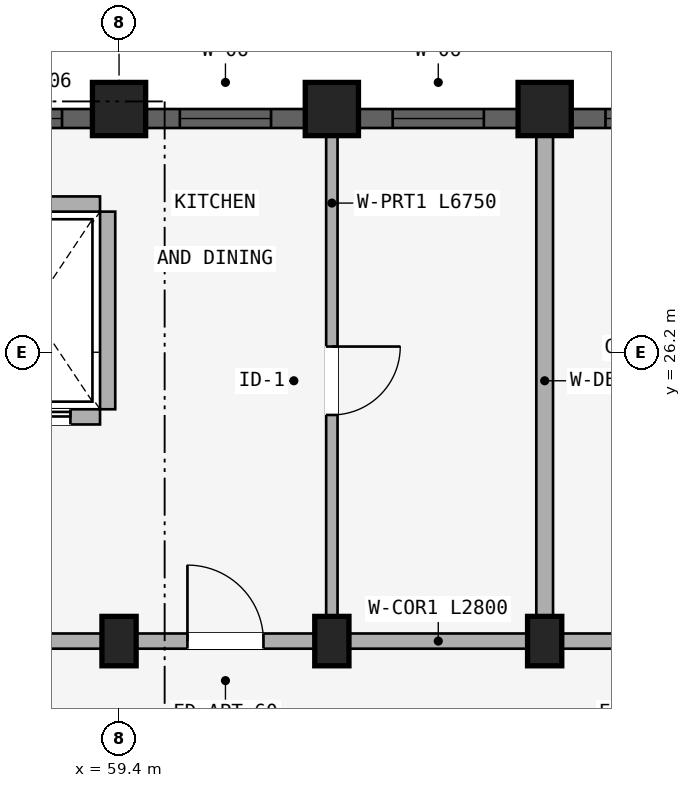
"""IFC4 building model, lengths in metres.
Left out: names, types, materials, properties, quantities, classifications, styles, units other than length and angle.
Written with IfcOpenShell. Run it as: python <this file> out.ifc"""

import sys

from ifc_helpers import new_model, si_unit, direction, frame, frame_2d, origin, origin_2d, place, context, subcontext, project, spatial, rectangle, extrude, element, fill, save


model = new_model("IFC4")
c1 = context("Model", 3, precision=1e-05, world=origin(), true_north=direction((0.0, 1.0)))
c2 = subcontext(c1, "Body", "Model", "MODEL_VIEW")
j1 = project(units=[si_unit("LENGTHUNIT", "METRE"), si_unit("PLANEANGLEUNIT", "RADIAN")], contexts=[c1])
p1 = place(None, origin())
s1 = spatial("IfcSite", under=j1, at=p1, CompositionType="ELEMENT")
p2 = place(p1, origin())
s2 = spatial("IfcBuilding", under=s1, at=p2, CompositionType="ELEMENT")
p3 = place(p2, frame((0.0, 0.0, 27.6)))
s3 = spatial("IfcBuildingStorey", under=s2, at=p3, CompositionType="ELEMENT", Elevation=27.6)
p4 = place(p3, frame((59.4, 29.4, 0.0), z_axis=(0.0, 0.0, 1.0), x_axis=(1.0, 0.0, 0.0)))
e1 = element("IfcColumn", 1, at=p4, inside=s3, PredefinedType="COLUMN", context=c2, shape_type="SweptSolid", body=[
    extrude(rectangle(XDim=0.7, YDim=0.7, at=origin_2d()), origin(), (0.0, 0.0, 1.0), 2.93),
])
p5 = place(p3, frame((59.4, 22.4, 0.0), z_axis=(0.0, 0.0, 1.0), x_axis=(1.0, 0.0, 0.0)))
e2 = element("IfcColumn", 2, at=p5, inside=s3, PredefinedType="COLUMN", context=c2, shape_type="SweptSolid", body=[
    extrude(rectangle(XDim=0.45, YDim=0.65, at=origin_2d()), origin(), (0.0, 0.0, 1.0), 2.93),
])
p6 = place(p3, frame((62.2, 29.4, 0.0), z_axis=(0.0, 0.0, 1.0), x_axis=(1.0, 0.0, 0.0)))
e3 = element("IfcColumn", 3, at=p6, inside=s3, PredefinedType="COLUMN", context=c2, shape_type="SweptSolid", body=[
    extrude(rectangle(XDim=0.7, YDim=0.7, at=origin_2d()), origin(), (0.0, 0.0, 1.0), 2.93),
])
p7 = place(p3, frame((62.2, 22.4, 0.0), z_axis=(0.0, 0.0, 1.0), x_axis=(1.0, 0.0, 0.0)))
e4 = element("IfcColumn", 4, at=p7, inside=s3, PredefinedType="COLUMN", context=c2, shape_type="SweptSolid", body=[
    extrude(rectangle(XDim=0.45, YDim=0.65, at=origin_2d()), origin(), (0.0, 0.0, 1.0), 2.93),
])
p8 = place(p3, frame((65.0, 29.4, 0.0), z_axis=(0.0, 0.0, 1.0), x_axis=(1.0, 0.0, 0.0)))
e5 = element("IfcColumn", 5, at=p8, inside=s3, PredefinedType="COLUMN", context=c2, shape_type="SweptSolid", body=[
    extrude(rectangle(XDim=0.7, YDim=0.7, at=origin_2d()), origin(), (0.0, 0.0, 1.0), 2.93),
])
p9 = place(p3, frame((65.0, 22.4, 0.0), z_axis=(0.0, 0.0, 1.0), x_axis=(1.0, 0.0, 0.0)))
e6 = element("IfcColumn", 6, at=p9, inside=s3, PredefinedType="COLUMN", context=c2, shape_type="SweptSolid", body=[
    extrude(rectangle(XDim=0.45, YDim=0.65, at=origin_2d()), origin(), (0.0, 0.0, 1.0), 2.93),
])
p10 = place(p3, frame((59.25, 28.05, 0.0), z_axis=(0.0, 0.0, 1.0), x_axis=(0.0, -1.0, 0.0)))
e7 = element("IfcWall", 7, at=p10, inside=s3, PredefinedType="STANDARD", context=c2, shape_type="SweptSolid", body=[
    extrude(rectangle(XDim=2.6, YDim=0.2, at=frame_2d((1.3, 0.0))), origin(), (0.0, 0.0, 1.0), 2.372),
])
p11 = place(p3, frame((57.35, 28.15, 0.0), z_axis=(0.0, 0.0, 1.0), x_axis=(1.0, 0.0, 0.0)))
e8 = element("IfcWall", 8, at=p11, inside=s3, PredefinedType="STANDARD", context=c2, shape_type="SweptSolid", body=[
    extrude(rectangle(XDim=1.8, YDim=0.2, at=frame_2d((0.9, 0.0))), origin(), (0.0, 0.0, 1.0), 2.93),
])
p12 = place(p3, frame((57.35, 25.35, 0.0), z_axis=(0.0, 0.0, 1.0), x_axis=(1.0, 0.0, 0.0)))
e9 = element("IfcWall", 9, at=p12, inside=s3, PredefinedType="STANDARD", context=c2, shape_type="SweptSolid", body=[
    extrude(rectangle(XDim=1.8, YDim=0.2, at=frame_2d((0.9, 0.0))), origin(), (0.0, 0.0, 1.0), 2.93),
])
p13 = place(p12, frame((0.39, 0.0, 0.0)))
e10 = element("IfcOpeningElement", 10, at=p13, cuts=e9, PredefinedType="OPENING", context=c2, shape_type="SweptSolid", body=[
    extrude(rectangle(XDim=1.02, YDim=2.15, at=frame_2d((0.51, 1.075))), frame((0.0, 0.11, 0.0), z_axis=(0.0, -1.0, 0.0), x_axis=(1.0, 0.0, 0.0)), (0.0, 0.0, 1.0), 0.22),
])
p14 = place(p3, frame((53.75, 22.4, 0.0), z_axis=(0.0, 0.0, 1.0), x_axis=(1.0, 0.0, 0.0)))
e11 = element("IfcWall", 11, at=p14, inside=s3, PredefinedType="STANDARD", context=c2, shape_type="SweptSolid", body=[
    extrude(rectangle(XDim=5.6, YDim=0.2, at=frame_2d((2.8, 0.0))), origin(), (0.0, 0.0, 1.0), 2.372),
])
p15 = place(p14, frame((1.91, 0.0, 0.0)))
e12 = element("IfcOpeningElement", 12, at=p15, cuts=e11, PredefinedType="OPENING", context=c2, shape_type="SweptSolid", body=[
    extrude(rectangle(XDim=1.22, YDim=2.15, at=frame_2d((0.61, 1.075))), frame((0.0, 0.11, 0.0), z_axis=(0.0, -1.0, 0.0), x_axis=(1.0, 0.0, 0.0)), (0.0, 0.0, 1.0), 0.22),
])
p16 = place(p3, frame((59.4, 22.4, 0.0), z_axis=(0.0, 0.0, 1.0), x_axis=(1.0, 0.0, 0.0)))
e13 = element("IfcWall", 13, at=p16, inside=s3, PredefinedType="STANDARD", context=c2, shape_type="SweptSolid", body=[
    extrude(rectangle(XDim=2.8, YDim=0.2, at=frame_2d((1.4, 0.0))), origin(), (0.0, 0.0, 1.0), 2.372),
])
p17 = place(p16, frame((0.9, 0.0, 0.0)))
e14 = element("IfcOpeningElement", 14, at=p17, cuts=e13, PredefinedType="OPENING", context=c2, shape_type="SweptSolid", body=[
    extrude(rectangle(XDim=1.0, YDim=2.15, at=frame_2d((0.5, 1.075))), frame((0.0, 0.11, 0.0), z_axis=(0.0, -1.0, 0.0), x_axis=(1.0, 0.0, 0.0)), (0.0, 0.0, 1.0), 0.22),
])
p18 = place(p3, frame((62.2, 22.4, 0.0), z_axis=(0.0, 0.0, 1.0), x_axis=(1.0, 0.0, 0.0)))
e15 = element("IfcWall", 15, at=p18, inside=s3, PredefinedType="STANDARD", context=c2, shape_type="SweptSolid", body=[
    extrude(rectangle(XDim=2.8, YDim=0.2, at=frame_2d((1.4, 0.0))), origin(), (0.0, 0.0, 1.0), 2.372),
])
p19 = place(p3, frame((65.0, 22.4, 0.0), z_axis=(0.0, 0.0, 1.0), x_axis=(1.0, 0.0, 0.0)))
e16 = element("IfcWall", 16, at=p19, inside=s3, PredefinedType="STANDARD", context=c2, shape_type="SweptSolid", body=[
    extrude(rectangle(XDim=2.8, YDim=0.2, at=frame_2d((1.4, 0.0))), origin(), (0.0, 0.0, 1.0), 2.372),
])
p20 = place(p19, frame((0.9, 0.0, 0.0)))
e17 = element("IfcOpeningElement", 17, at=p20, cuts=e16, PredefinedType="OPENING", context=c2, shape_type="SweptSolid", body=[
    extrude(rectangle(XDim=1.0, YDim=2.15, at=frame_2d((0.5, 1.075))), frame((0.0, 0.11, 0.0), z_axis=(0.0, -1.0, 0.0), x_axis=(1.0, 0.0, 0.0)), (0.0, 0.0, 1.0), 0.22),
])
p21 = place(p3, frame((62.2, 29.2, 0.0), z_axis=(0.0, 0.0, 1.0), x_axis=(0.0, -1.0, 0.0)))
e18 = element("IfcWall", 18, at=p21, inside=s3, PredefinedType="PARTITIONING", context=c2, shape_type="SweptSolid", body=[
    extrude(rectangle(XDim=6.75, YDim=0.15, at=frame_2d((3.375, 0.0))), origin(), (0.0, 0.0, 1.0), 2.372),
])
p22 = place(p21, frame((2.925, 0.0, 0.0)))
e19 = element("IfcOpeningElement", 19, at=p22, cuts=e18, PredefinedType="OPENING", context=c2, shape_type="SweptSolid", body=[
    extrude(rectangle(XDim=0.9, YDim=2.1, at=frame_2d((0.45, 1.05))), frame((0.0, 0.085, 0.0), z_axis=(0.0, -1.0, 0.0), x_axis=(1.0, 0.0, 0.0)), (0.0, 0.0, 1.0), 0.17),
])
p23 = place(p3, frame((65.0, 29.2, 0.0), z_axis=(0.0, 0.0, 1.0), x_axis=(0.0, -1.0, 0.0)))
e20 = element("IfcWall", 20, at=p23, inside=s3, PredefinedType="STANDARD", context=c2, shape_type="SweptSolid", body=[
    extrude(rectangle(XDim=6.75, YDim=0.22, at=frame_2d((3.375, 0.0))), origin(), (0.0, 0.0, 1.0), 2.372),
])
p24 = place(p3, frame((56.628, 29.275, 0.0), z_axis=(0.0, 0.0, 1.0), x_axis=(1.0, 0.0, 0.0)))
e21 = element("IfcWall", 21, at=p24, inside=s3, PredefinedType="STANDARD", context=c2, shape_type="SweptSolid", body=[
    extrude(rectangle(XDim=2.422, YDim=0.25, at=frame_2d((1.211, 0.0))), origin(), (0.0, 0.0, 1.0), 2.472),
])
p25 = place(p24, frame((0.822, 0.0, 0.772)))
e22 = element("IfcOpeningElement", 22, at=p25, cuts=e21, PredefinedType="OPENING", context=c2, shape_type="SweptSolid", body=[
    extrude(rectangle(XDim=1.2, YDim=1.5, at=frame_2d((0.6, 0.75))), frame((0.0, 0.135, 0.0), z_axis=(0.0, -1.0, 0.0), x_axis=(1.0, 0.0, 0.0)), (0.0, 0.0, 1.0), 0.27),
])
p26 = place(p3, frame((59.753, 29.275, 0.0), z_axis=(0.0, 0.0, 1.0), x_axis=(1.0, 0.0, 0.0)))
e23 = element("IfcWall", 23, at=p26, inside=s3, PredefinedType="STANDARD", context=c2, shape_type="SweptSolid", body=[
    extrude(rectangle(XDim=2.093, YDim=0.25, at=frame_2d((1.046, 0.0))), origin(), (0.0, 0.0, 1.0), 2.472),
])
p27 = place(p26, frame((0.447, 0.0, 0.772)))
e24 = element("IfcOpeningElement", 24, at=p27, cuts=e23, PredefinedType="OPENING", context=c2, shape_type="SweptSolid", body=[
    extrude(rectangle(XDim=1.2, YDim=1.5, at=frame_2d((0.6, 0.75))), frame((0.0, 0.135, 0.0), z_axis=(0.0, -1.0, 0.0), x_axis=(1.0, 0.0, 0.0)), (0.0, 0.0, 1.0), 0.27),
])
p28 = place(p3, frame((62.553, 29.275, 0.0), z_axis=(0.0, 0.0, 1.0), x_axis=(1.0, 0.0, 0.0)))
e25 = element("IfcWall", 25, at=p28, inside=s3, PredefinedType="STANDARD", context=c2, shape_type="SweptSolid", body=[
    extrude(rectangle(XDim=2.093, YDim=0.25, at=frame_2d((1.046, 0.0))), origin(), (0.0, 0.0, 1.0), 2.472),
])
p29 = place(p28, frame((0.447, 0.0, 0.772)))
e26 = element("IfcOpeningElement", 26, at=p29, cuts=e25, PredefinedType="OPENING", context=c2, shape_type="SweptSolid", body=[
    extrude(rectangle(XDim=1.2, YDim=1.5, at=frame_2d((0.6, 0.75))), frame((0.0, 0.135, 0.0), z_axis=(0.0, -1.0, 0.0), x_axis=(1.0, 0.0, 0.0)), (0.0, 0.0, 1.0), 0.27),
])
p30 = place(p3, frame((65.354, 29.275, 0.0), z_axis=(0.0, 0.0, 1.0), x_axis=(1.0, 0.0, 0.0)))
e27 = element("IfcWall", 27, at=p30, inside=s3, PredefinedType="STANDARD", context=c2, shape_type="SweptSolid", body=[
    extrude(rectangle(XDim=2.093, YDim=0.25, at=frame_2d((1.046, 0.0))), origin(), (0.0, 0.0, 1.0), 2.472),
])
p31 = place(p30, frame((0.447, 0.0, 0.772)))
e28 = element("IfcOpeningElement", 28, at=p31, cuts=e27, PredefinedType="OPENING", context=c2, shape_type="SweptSolid", body=[
    extrude(rectangle(XDim=1.2, YDim=1.5, at=frame_2d((0.6, 0.75))), frame((0.0, 0.135, 0.0), z_axis=(0.0, -1.0, 0.0), x_axis=(1.0, 0.0, 0.0)), (0.0, 0.0, 1.0), 0.27),
])
p32 = place(p25, origin())
e29 = element("IfcWindow", 29, at=p32, inside=s3, PartitioningType="SINGLE_PANEL", PredefinedType="WINDOW", context=c2, shape_type="SweptSolid", body=[
    extrude(rectangle(XDim=1.2, YDim=1.5, at=frame_2d((0.6, 0.75))), frame((0.0, 0.03, 0.0), z_axis=(0.0, -1.0, 0.0), x_axis=(1.0, 0.0, 0.0)), (0.0, 0.0, 1.0), 0.06),
])
fill(e22, e29)
p33 = place(p27, origin())
e30 = element("IfcWindow", 30, at=p33, inside=s3, PartitioningType="SINGLE_PANEL", PredefinedType="WINDOW", context=c2, shape_type="SweptSolid", body=[
    extrude(rectangle(XDim=1.2, YDim=1.5, at=frame_2d((0.6, 0.75))), frame((0.0, 0.03, 0.0), z_axis=(0.0, -1.0, 0.0), x_axis=(1.0, 0.0, 0.0)), (0.0, 0.0, 1.0), 0.06),
])
fill(e24, e30)
p34 = place(p29, origin())
e31 = element("IfcWindow", 31, at=p34, inside=s3, PartitioningType="SINGLE_PANEL", PredefinedType="WINDOW", context=c2, shape_type="SweptSolid", body=[
    extrude(rectangle(XDim=1.2, YDim=1.5, at=frame_2d((0.6, 0.75))), frame((0.0, 0.03, 0.0), z_axis=(0.0, -1.0, 0.0), x_axis=(1.0, 0.0, 0.0)), (0.0, 0.0, 1.0), 0.06),
])
fill(e26, e31)
p35 = place(p31, origin())
e32 = element("IfcWindow", 32, at=p35, inside=s3, PartitioningType="SINGLE_PANEL", PredefinedType="WINDOW", context=c2, shape_type="SweptSolid", body=[
    extrude(rectangle(XDim=1.2, YDim=1.5, at=frame_2d((0.6, 0.75))), frame((0.0, 0.03, 0.0), z_axis=(0.0, -1.0, 0.0), x_axis=(1.0, 0.0, 0.0)), (0.0, 0.0, 1.0), 0.06),
])
fill(e28, e32)
p36 = place(p13, origin())
e33 = element("IfcDoor", 33, at=p36, inside=s3, OperationType="SLIDING_TO_RIGHT", PredefinedType="DOOR", context=c2, shape_type="SweptSolid", body=[
    extrude(rectangle(XDim=1.02, YDim=2.15, at=frame_2d((0.51, 1.075))), frame((0.0, 0.025, 0.0), z_axis=(0.0, -1.0, 0.0), x_axis=(1.0, 0.0, 0.0)), (0.0, 0.0, 1.0), 0.05),
])
fill(e10, e33)
p37 = place(p17, origin())
e34 = element("IfcDoor", 34, at=p37, inside=s3, OperationType="SINGLE_SWING_LEFT", PredefinedType="DOOR", context=c2, shape_type="SweptSolid", body=[
    extrude(rectangle(XDim=1.0, YDim=2.15, at=frame_2d((0.5, 1.075))), frame((0.0, 0.025, 0.0), z_axis=(0.0, -1.0, 0.0), x_axis=(1.0, 0.0, 0.0)), (0.0, 0.0, 1.0), 0.05),
])
fill(e14, e34)
p38 = place(p22, origin())
e35 = element("IfcDoor", 35, at=p38, inside=s3, OperationType="SINGLE_SWING_LEFT", PredefinedType="DOOR", context=c2, shape_type="SweptSolid", body=[
    extrude(rectangle(XDim=0.9, YDim=2.1, at=frame_2d((0.45, 1.05))), frame((0.0, 0.025, 0.0), z_axis=(0.0, -1.0, 0.0), x_axis=(1.0, 0.0, 0.0)), (0.0, 0.0, 1.0), 0.05),
])
fill(e19, e35)
save(model, sys.argv[1])
